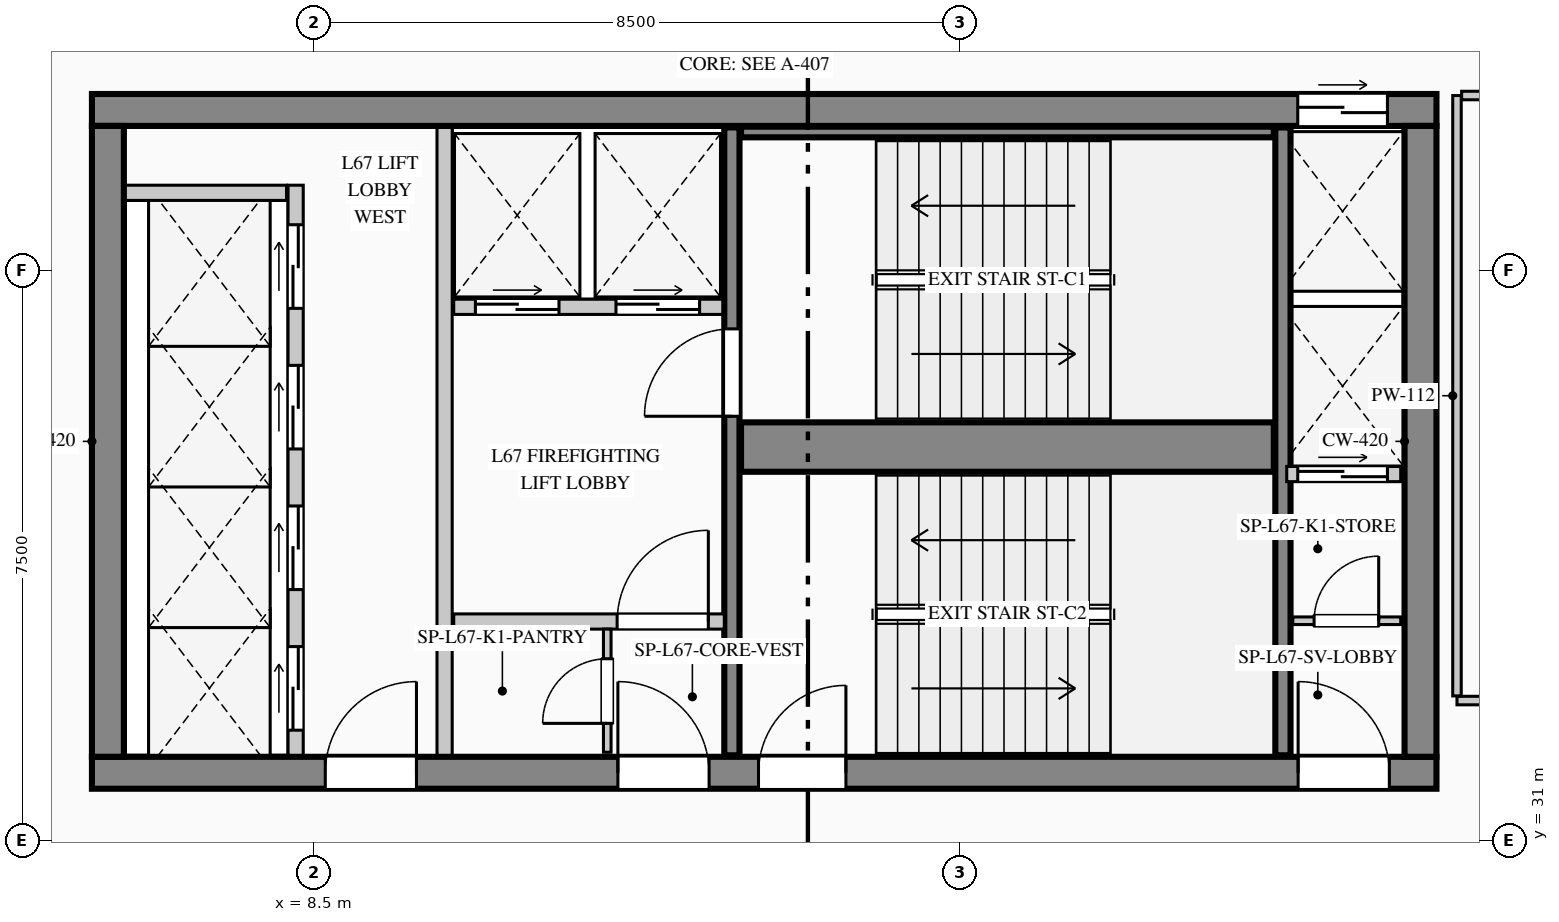
"""IFC4 building model, lengths in metres.
Left out: names, types, materials, properties, quantities, classifications, styles, units other than length and angle.
Written with IfcOpenShell. Run it as: python <this file> out.ifc"""

import sys

from ifc_helpers import new_model, si_unit, direction, frame, frame_2d, origin, place, context, subcontext, project, spatial, rectangle, extrude, element, fill, save


model = new_model("IFC4")
c1 = context("Model", 3, precision=1e-05, world=origin(), true_north=direction((0.0, 1.0)))
c2 = subcontext(c1, "Body", "Model", "MODEL_VIEW")
j1 = project(units=[si_unit("LENGTHUNIT", "METRE"), si_unit("PLANEANGLEUNIT", "RADIAN")], contexts=[c1])
p1 = place(None, origin())
s1 = spatial("IfcSite", under=j1, at=p1, CompositionType="ELEMENT")
p2 = place(p1, origin())
s2 = spatial("IfcBuilding", under=s1, at=p2, CompositionType="ELEMENT")
p3 = place(p2, frame((0.0, 0.0, 280.4)))
s3 = spatial("IfcBuildingStorey", under=s2, at=p3, CompositionType="ELEMENT", Elevation=280.4)
p4 = place(p3, frame((5.58, 40.61, 0.0), z_axis=(0.0, 0.0, 1.0), x_axis=(1.0, 0.0, 0.0)))
e1 = element("IfcWall", 1, at=p4, inside=s3, PredefinedType="SHEAR", context=c2, shape_type="SweptSolid", body=[
    extrude(rectangle(XDim=17.69, YDim=0.42, at=frame_2d((8.845, 0.0))), origin(), (0.0, 0.0, 1.0), 3.95),
])
p5 = place(p4, frame((15.865, 0.0, 0.0)))
e2 = element("IfcOpeningElement", 2, at=p5, cuts=e1, PredefinedType="OPENING", context=c2, shape_type="SweptSolid", body=[
    extrude(rectangle(XDim=1.18, YDim=2.25, at=frame_2d((0.59, 1.125))), frame((0.0, 0.22, 0.0), z_axis=(0.0, -1.0, 0.0), x_axis=(1.0, 0.0, 0.0)), (0.0, 0.0, 1.0), 0.44),
])
p6 = place(p3, frame((5.58, 31.89, 0.0), z_axis=(0.0, 0.0, 1.0), x_axis=(1.0, 0.0, 0.0)))
e3 = element("IfcWall", 3, at=p6, inside=s3, PredefinedType="SHEAR", context=c2, shape_type="SweptSolid", body=[
    extrude(rectangle(XDim=17.69, YDim=0.42, at=frame_2d((8.845, 0.0))), origin(), (0.0, 0.0, 1.0), 3.95),
])
p7 = place(p6, frame((3.07, 0.0, 0.0)))
e4 = element("IfcOpeningElement", 4, at=p7, cuts=e3, PredefinedType="OPENING", context=c2, shape_type="SweptSolid", body=[
    extrude(rectangle(XDim=1.2, YDim=2.2, at=frame_2d((0.6, 1.1))), frame((0.0, 0.22, 0.0), z_axis=(0.0, -1.0, 0.0), x_axis=(1.0, 0.0, 0.0)), (0.0, 0.0, 1.0), 0.44),
])
p8 = place(p6, frame((6.92, 0.0, 0.0)))
e5 = element("IfcOpeningElement", 5, at=p8, cuts=e3, PredefinedType="OPENING", context=c2, shape_type="SweptSolid", body=[
    extrude(rectangle(XDim=1.2, YDim=2.2, at=frame_2d((0.6, 1.1))), frame((0.0, 0.22, 0.0), z_axis=(0.0, -1.0, 0.0), x_axis=(1.0, 0.0, 0.0)), (0.0, 0.0, 1.0), 0.44),
])
p9 = place(p6, frame((8.77, 0.0, 0.0)))
e6 = element("IfcOpeningElement", 6, at=p9, cuts=e3, PredefinedType="OPENING", context=c2, shape_type="SweptSolid", body=[
    extrude(rectangle(XDim=1.15, YDim=2.2, at=frame_2d((0.575, 1.1))), frame((0.0, 0.22, 0.0), z_axis=(0.0, -1.0, 0.0), x_axis=(1.0, 0.0, 0.0)), (0.0, 0.0, 1.0), 0.44),
])
p10 = place(p6, frame((15.87, 0.0, 0.0)))
e7 = element("IfcOpeningElement", 7, at=p10, cuts=e3, PredefinedType="OPENING", context=c2, shape_type="SweptSolid", body=[
    extrude(rectangle(XDim=1.2, YDim=2.2, at=frame_2d((0.6, 1.1))), frame((0.0, 0.22, 0.0), z_axis=(0.0, -1.0, 0.0), x_axis=(1.0, 0.0, 0.0)), (0.0, 0.0, 1.0), 0.44),
])
for number, where, z_axis, x_axis in (
    (8, (5.79, 32.1, 0.0), (0.0, 0.0, 1.0), (0.0, 1.0, 0.0)),
    (9, (23.06, 32.1, 0.0), (0.0, 0.0, 1.0), (0.0, 1.0, 0.0)),
):
    element("IfcWall", number, at=place(p3, frame(where, z_axis=z_axis, x_axis=x_axis)), inside=s3, PredefinedType="SHEAR", context=c2, shape_type="SweptSolid", body=[
        extrude(rectangle(XDim=8.3, YDim=0.42, at=frame_2d((4.15, 0.0))), origin(), (0.0, 0.0, 1.0), 3.95),
    ])
p11 = place(p3, frame((14.0, 32.12, 0.0), z_axis=(0.0, 0.0, 1.0), x_axis=(0.0, 1.0, 0.0)))
e10 = element("IfcWall", 10, at=p11, inside=s3, PredefinedType="SHEAR", context=c2, shape_type="SweptSolid", body=[
    extrude(rectangle(XDim=8.26, YDim=0.2, at=frame_2d((4.13, 0.0))), origin(), (0.0, 0.0, 1.0), 3.95),
])
p12 = place(p11, frame((4.46, 0.0, 0.0)))
e11 = element("IfcOpeningElement", 11, at=p12, cuts=e10, PredefinedType="OPENING", context=c2, shape_type="SweptSolid", body=[
    extrude(rectangle(XDim=1.15, YDim=2.2, at=frame_2d((0.575, 1.1))), frame((0.0, 0.11, 0.0), z_axis=(0.0, -1.0, 0.0), x_axis=(1.0, 0.0, 0.0)), (0.0, 0.0, 1.0), 0.22),
])
p13 = place(p3, frame((14.12, 36.175, 0.0), z_axis=(0.0, 0.0, 1.0), x_axis=(1.0, 0.0, 0.0)))
e12 = element("IfcWall", 12, at=p13, inside=s3, PredefinedType="SHEAR", context=c2, shape_type="SweptSolid", body=[
    extrude(rectangle(XDim=7.01, YDim=0.65, at=frame_2d((3.505, 0.0))), origin(), (0.0, 0.0, 1.0), 3.95),
])
p14 = place(p3, frame((21.25, 32.12, 0.0), z_axis=(0.0, 0.0, 1.0), x_axis=(0.0, 1.0, 0.0)))
e13 = element("IfcWall", 13, at=p14, inside=s3, PredefinedType="SHEAR", context=c2, shape_type="SweptSolid", body=[
    extrude(rectangle(XDim=8.26, YDim=0.2, at=frame_2d((4.13, 0.0))), origin(), (0.0, 0.0, 1.0), 3.95),
])
p15 = place(p3, frame((14.12, 40.32, 0.0), z_axis=(0.0, 0.0, 1.0), x_axis=(1.0, 0.0, 0.0)))
e14 = element("IfcWall", 14, at=p15, inside=s3, PredefinedType="SHEAR", context=c2, shape_type="SweptSolid", body=[
    extrude(rectangle(XDim=7.01, YDim=0.14, at=frame_2d((3.505, 0.0))), origin(), (0.0, 0.0, 1.0), 3.95),
])
p16 = place(p3, frame((5.6, 4.32, 0.0), z_axis=(0.0, 0.0, 1.0), x_axis=(-0.075839920993, 0.997120006009, 0.0)))
e15 = element("IfcWall", 15, at=p16, inside=s3, PredefinedType="STANDARD", context=c2, shape_type="SweptSolid", body=[
    extrude(rectangle(XDim=37.468, YDim=0.24, at=frame_2d((18.734, 0.0))), origin(), (0.0, 0.0, 1.0), 3.7),
])
p17 = place(p16, frame((12.663, 0.0, 0.9)))
e16 = element("IfcOpeningElement", 16, at=p17, cuts=e15, PredefinedType="OPENING", context=c2, shape_type="SweptSolid", body=[
    extrude(rectangle(XDim=1.65, YDim=1.95, at=frame_2d((0.825, 0.975))), frame((0.0, 0.13, 0.0), z_axis=(0.0, -1.0, 0.0), x_axis=(1.0, 0.0, 0.0)), (0.0, 0.0, 1.0), 0.26),
])
p18 = place(p3, frame((8.26, 32.12, 0.0), z_axis=(0.0, 0.0, 1.0), x_axis=(0.0, 1.0, 0.0)))
e17 = element("IfcWall", 17, at=p18, inside=s3, PredefinedType="PARTITIONING", context=c2, shape_type="SweptSolid", body=[
    extrude(rectangle(XDim=7.5, YDim=0.2, at=frame_2d((3.75, 0.0))), origin(), (0.0, 0.0, 1.0), 3.7),
])
p19 = place(p18, frame((0.33, 0.0, 0.0)))
e18 = element("IfcOpeningElement", 18, at=p19, cuts=e17, PredefinedType="OPENING", context=c2, shape_type="SweptSolid", body=[
    extrude(rectangle(XDim=1.1, YDim=2.2, at=frame_2d((0.55, 1.1))), frame((0.0, 0.11, 0.0), z_axis=(0.0, -1.0, 0.0), x_axis=(1.0, 0.0, 0.0)), (0.0, 0.0, 1.0), 0.22),
])
p20 = place(p18, frame((2.18, 0.0, 0.0)))
e19 = element("IfcOpeningElement", 19, at=p20, cuts=e17, PredefinedType="OPENING", context=c2, shape_type="SweptSolid", body=[
    extrude(rectangle(XDim=1.1, YDim=2.2, at=frame_2d((0.55, 1.1))), frame((0.0, 0.11, 0.0), z_axis=(0.0, -1.0, 0.0), x_axis=(1.0, 0.0, 0.0)), (0.0, 0.0, 1.0), 0.22),
])
p21 = place(p18, frame((4.03, 0.0, 0.0)))
e20 = element("IfcOpeningElement", 20, at=p21, cuts=e17, PredefinedType="OPENING", context=c2, shape_type="SweptSolid", body=[
    extrude(rectangle(XDim=1.1, YDim=2.2, at=frame_2d((0.55, 1.1))), frame((0.0, 0.11, 0.0), z_axis=(0.0, -1.0, 0.0), x_axis=(1.0, 0.0, 0.0)), (0.0, 0.0, 1.0), 0.22),
])
p22 = place(p18, frame((5.88, 0.0, 0.0)))
e21 = element("IfcOpeningElement", 21, at=p22, cuts=e17, PredefinedType="OPENING", context=c2, shape_type="SweptSolid", body=[
    extrude(rectangle(XDim=1.1, YDim=2.2, at=frame_2d((0.55, 1.1))), frame((0.0, 0.11, 0.0), z_axis=(0.0, -1.0, 0.0), x_axis=(1.0, 0.0, 0.0)), (0.0, 0.0, 1.0), 0.22),
])
p23 = place(p3, frame((6.02, 39.52, 0.0), z_axis=(0.0, 0.0, 1.0), x_axis=(1.0, 0.0, 0.0)))
e22 = element("IfcWall", 22, at=p23, inside=s3, PredefinedType="PARTITIONING", context=c2, shape_type="SweptSolid", body=[
    extrude(rectangle(XDim=2.12, YDim=0.2, at=frame_2d((1.06, 0.0))), origin(), (0.0, 0.0, 1.0), 3.7),
])
p24 = place(p3, frame((10.22, 32.12, 0.0), z_axis=(0.0, 0.0, 1.0), x_axis=(0.0, 1.0, 0.0)))
e23 = element("IfcWall", 23, at=p24, inside=s3, PredefinedType="PARTITIONING", context=c2, shape_type="SweptSolid", body=[
    extrude(rectangle(XDim=8.26, YDim=0.2, at=frame_2d((4.13, 0.0))), origin(), (0.0, 0.0, 1.0), 3.7),
])
p25 = place(p3, frame((10.34, 38.02, 0.0), z_axis=(0.0, 0.0, 1.0), x_axis=(1.0, 0.0, 0.0)))
e24 = element("IfcWall", 24, at=p25, inside=s3, PredefinedType="PARTITIONING", context=c2, shape_type="SweptSolid", body=[
    extrude(rectangle(XDim=3.54, YDim=0.2, at=frame_2d((1.77, 0.0))), origin(), (0.0, 0.0, 1.0), 3.7),
])
p26 = place(p25, frame((0.285, 0.0, 0.0)))
e25 = element("IfcOpeningElement", 25, at=p26, cuts=e24, PredefinedType="OPENING", context=c2, shape_type="SweptSolid", body=[
    extrude(rectangle(XDim=1.1, YDim=2.2, at=frame_2d((0.55, 1.1))), frame((0.0, 0.11, 0.0), z_axis=(0.0, -1.0, 0.0), x_axis=(1.0, 0.0, 0.0)), (0.0, 0.0, 1.0), 0.22),
])
p27 = place(p25, frame((2.135, 0.0, 0.0)))
e26 = element("IfcOpeningElement", 26, at=p27, cuts=e24, PredefinedType="OPENING", context=c2, shape_type="SweptSolid", body=[
    extrude(rectangle(XDim=1.1, YDim=2.2, at=frame_2d((0.55, 1.1))), frame((0.0, 0.11, 0.0), z_axis=(0.0, -1.0, 0.0), x_axis=(1.0, 0.0, 0.0)), (0.0, 0.0, 1.0), 0.22),
])
p28 = place(p3, frame((10.34, 33.88, 0.0), z_axis=(0.0, 0.0, 1.0), x_axis=(1.0, 0.0, 0.0)))
e27 = element("IfcWall", 27, at=p28, inside=s3, PredefinedType="PARTITIONING", context=c2, shape_type="SweptSolid", body=[
    extrude(rectangle(XDim=3.56, YDim=0.2, at=frame_2d((1.78, 0.0))), origin(), (0.0, 0.0, 1.0), 3.7),
])
p29 = place(p28, frame((2.15, 0.0, 0.0)))
e28 = element("IfcOpeningElement", 28, at=p29, cuts=e27, PredefinedType="OPENING", context=c2, shape_type="SweptSolid", body=[
    extrude(rectangle(XDim=1.2, YDim=2.2, at=frame_2d((0.6, 1.1))), frame((0.0, 0.11, 0.0), z_axis=(0.0, -1.0, 0.0), x_axis=(1.0, 0.0, 0.0)), (0.0, 0.0, 1.0), 0.22),
])
p30 = place(p3, frame((12.36, 32.16, 0.0), z_axis=(0.0, 0.0, 1.0), x_axis=(0.0, 1.0, 0.0)))
e29 = element("IfcWall", 29, at=p30, inside=s3, PredefinedType="PARTITIONING", context=c2, shape_type="SweptSolid", body=[
    extrude(rectangle(XDim=1.62, YDim=0.1, at=frame_2d((0.81, 0.0))), origin(), (0.0, 0.0, 1.0), 3.7),
])
p31 = place(p30, frame((0.38, 0.0, 0.0)))
e30 = element("IfcOpeningElement", 30, at=p31, cuts=e29, PredefinedType="OPENING", context=c2, shape_type="SweptSolid", body=[
    extrude(rectangle(XDim=0.85, YDim=2.1, at=frame_2d((0.425, 1.05))), frame((0.0, 0.06, 0.0), z_axis=(0.0, -1.0, 0.0), x_axis=(1.0, 0.0, 0.0)), (0.0, 0.0, 1.0), 0.12),
])
p32 = place(p3, frame((21.38, 33.89, 0.0), z_axis=(0.0, 0.0, 1.0), x_axis=(1.0, 0.0, 0.0)))
e31 = element("IfcWall", 31, at=p32, inside=s3, PredefinedType="PARTITIONING", context=c2, shape_type="SweptSolid", body=[
    extrude(rectangle(XDim=1.42, YDim=0.1, at=frame_2d((0.71, 0.0))), origin(), (0.0, 0.0, 1.0), 3.7),
])
p33 = place(p32, frame((0.28, 0.0, 0.0)))
e32 = element("IfcOpeningElement", 32, at=p33, cuts=e31, PredefinedType="OPENING", context=c2, shape_type="SweptSolid", body=[
    extrude(rectangle(XDim=0.85, YDim=2.1, at=frame_2d((0.425, 1.05))), frame((0.0, 0.06, 0.0), z_axis=(0.0, -1.0, 0.0), x_axis=(1.0, 0.0, 0.0)), (0.0, 0.0, 1.0), 0.12),
])
p34 = place(p3, frame((21.3, 35.82, 0.0), z_axis=(0.0, 0.0, 1.0), x_axis=(1.0, 0.0, 0.0)))
e33 = element("IfcWall", 33, at=p34, inside=s3, PredefinedType="PARTITIONING", context=c2, shape_type="SweptSolid", body=[
    extrude(rectangle(XDim=1.5, YDim=0.2, at=frame_2d((0.75, 0.0))), origin(), (0.0, 0.0, 1.0), 3.7),
])
p35 = place(p34, frame((0.145, 0.0, 0.0)))
e34 = element("IfcOpeningElement", 34, at=p35, cuts=e33, PredefinedType="OPENING", context=c2, shape_type="SweptSolid", body=[
    extrude(rectangle(XDim=1.18, YDim=2.25, at=frame_2d((0.59, 1.125))), frame((0.0, 0.11, 0.0), z_axis=(0.0, -1.0, 0.0), x_axis=(1.0, 0.0, 0.0)), (0.0, 0.0, 1.0), 0.22),
])
p36 = place(p3, frame((28.654, 32.84, 0.0), z_axis=(0.0, 0.0, 1.0), x_axis=(-1.0, 0.0, 0.0)))
e35 = element("IfcWall", 35, at=p36, inside=s3, PredefinedType="PARTITIONING", context=c2, shape_type="SweptSolid", body=[
    extrude(rectangle(XDim=5.114, YDim=0.112, at=frame_2d((2.557, 0.0))), origin(), (0.0, 0.0, 1.0), 3.7),
])
p37 = place(p36, frame((2.677, 0.0, 0.0)))
e36 = element("IfcOpeningElement", 36, at=p37, cuts=e35, PredefinedType="OPENING", context=c2, shape_type="SweptSolid", body=[
    extrude(rectangle(XDim=1.0, YDim=2.15, at=frame_2d((0.5, 1.075))), frame((0.0, 0.066, 0.0), z_axis=(0.0, -1.0, 0.0), x_axis=(1.0, 0.0, 0.0)), (0.0, 0.0, 1.0), 0.132),
])
p38 = place(p3, frame((23.54, 32.901, 0.0), z_axis=(0.0, 0.0, 1.0), x_axis=(0.0, 1.0, 0.0)))
e37 = element("IfcWall", 37, at=p38, inside=s3, PredefinedType="PARTITIONING", context=c2, shape_type="SweptSolid", body=[
    extrude(rectangle(XDim=7.899, YDim=0.112, at=frame_2d((3.95, 0.0))), origin(), (0.0, 0.0, 1.0), 3.7),
])
p39 = place(p3, frame((23.601, 40.8, 0.0), z_axis=(0.0, 0.0, 1.0), x_axis=(1.0, 0.0, 0.0)))
e38 = element("IfcWall", 38, at=p39, inside=s3, PredefinedType="PARTITIONING", context=c2, shape_type="SweptSolid", body=[
    extrude(rectangle(XDim=5.869, YDim=0.112, at=frame_2d((2.935, 0.0))), origin(), (0.0, 0.0, 1.0), 3.7),
])
p40 = place(p7, origin())
e39 = element("IfcDoor", 39, at=p40, inside=s3, OperationType="SINGLE_SWING_RIGHT", PredefinedType="DOOR", context=c2, shape_type="SweptSolid", body=[
    extrude(rectangle(XDim=1.2, YDim=2.2, at=frame_2d((0.6, 1.1))), frame((0.0, 0.025, 0.0), z_axis=(0.0, -1.0, 0.0), x_axis=(1.0, 0.0, 0.0)), (0.0, 0.0, 1.0), 0.05),
])
fill(e4, e39)
p41 = place(p8, origin())
e40 = element("IfcDoor", 40, at=p41, inside=s3, OperationType="SINGLE_SWING_LEFT", PredefinedType="DOOR", context=c2, shape_type="SweptSolid", body=[
    extrude(rectangle(XDim=1.2, YDim=2.2, at=frame_2d((0.6, 1.1))), frame((0.0, 0.025, 0.0), z_axis=(0.0, -1.0, 0.0), x_axis=(1.0, 0.0, 0.0)), (0.0, 0.0, 1.0), 0.05),
])
fill(e5, e40)
p42 = place(p9, origin())
e41 = element("IfcDoor", 41, at=p42, inside=s3, OperationType="SINGLE_SWING_RIGHT", PredefinedType="DOOR", context=c2, shape_type="SweptSolid", body=[
    extrude(rectangle(XDim=1.15, YDim=2.2, at=frame_2d((0.575, 1.1))), frame((0.0, 0.025, 0.0), z_axis=(0.0, -1.0, 0.0), x_axis=(1.0, 0.0, 0.0)), (0.0, 0.0, 1.0), 0.05),
])
fill(e6, e41)
p43 = place(p10, origin())
e42 = element("IfcDoor", 42, at=p43, inside=s3, OperationType="SINGLE_SWING_LEFT", PredefinedType="DOOR", context=c2, shape_type="SweptSolid", body=[
    extrude(rectangle(XDim=1.2, YDim=2.2, at=frame_2d((0.6, 1.1))), frame((0.0, 0.025, 0.0), z_axis=(0.0, -1.0, 0.0), x_axis=(1.0, 0.0, 0.0)), (0.0, 0.0, 1.0), 0.05),
])
fill(e7, e42)
p44 = place(p29, origin())
e43 = element("IfcDoor", 43, at=p44, inside=s3, OperationType="SINGLE_SWING_RIGHT", PredefinedType="DOOR", context=c2, shape_type="SweptSolid", body=[
    extrude(rectangle(XDim=1.2, YDim=2.2, at=frame_2d((0.6, 1.1))), frame((0.0, 0.025, 0.0), z_axis=(0.0, -1.0, 0.0), x_axis=(1.0, 0.0, 0.0)), (0.0, 0.0, 1.0), 0.05),
])
fill(e28, e43)
p45 = place(p31, origin())
e44 = element("IfcDoor", 44, at=p45, inside=s3, OperationType="SINGLE_SWING_LEFT", PredefinedType="DOOR", context=c2, shape_type="SweptSolid", body=[
    extrude(rectangle(XDim=0.85, YDim=2.1, at=frame_2d((0.425, 1.05))), frame((0.0, 0.025, 0.0), z_axis=(0.0, -1.0, 0.0), x_axis=(1.0, 0.0, 0.0)), (0.0, 0.0, 1.0), 0.05),
])
fill(e30, e44)
p46 = place(p33, origin())
e45 = element("IfcDoor", 45, at=p46, inside=s3, OperationType="SINGLE_SWING_RIGHT", PredefinedType="DOOR", context=c2, shape_type="SweptSolid", body=[
    extrude(rectangle(XDim=0.85, YDim=2.1, at=frame_2d((0.425, 1.05))), frame((0.0, 0.025, 0.0), z_axis=(0.0, -1.0, 0.0), x_axis=(1.0, 0.0, 0.0)), (0.0, 0.0, 1.0), 0.05),
])
fill(e32, e45)
p47 = place(p12, origin())
e46 = element("IfcDoor", 46, at=p47, inside=s3, OperationType="SINGLE_SWING_LEFT", PredefinedType="DOOR", context=c2, shape_type="SweptSolid", body=[
    extrude(rectangle(XDim=1.15, YDim=2.2, at=frame_2d((0.575, 1.1))), frame((0.0, 0.025, 0.0), z_axis=(0.0, -1.0, 0.0), x_axis=(1.0, 0.0, 0.0)), (0.0, 0.0, 1.0), 0.05),
])
fill(e11, e46)
p48 = place(p19, origin())
e47 = element("IfcDoor", 47, at=p48, inside=s3, OperationType="DOUBLE_DOOR_SLIDING", PredefinedType="DOOR", context=c2, shape_type="SweptSolid", body=[
    extrude(rectangle(XDim=1.1, YDim=2.2, at=frame_2d((0.55, 1.1))), frame((0.0, 0.025, 0.0), z_axis=(0.0, -1.0, 0.0), x_axis=(1.0, 0.0, 0.0)), (0.0, 0.0, 1.0), 0.05),
])
fill(e18, e47)
p49 = place(p20, origin())
e48 = element("IfcDoor", 48, at=p49, inside=s3, OperationType="DOUBLE_DOOR_SLIDING", PredefinedType="DOOR", context=c2, shape_type="SweptSolid", body=[
    extrude(rectangle(XDim=1.1, YDim=2.2, at=frame_2d((0.55, 1.1))), frame((0.0, 0.025, 0.0), z_axis=(0.0, -1.0, 0.0), x_axis=(1.0, 0.0, 0.0)), (0.0, 0.0, 1.0), 0.05),
])
fill(e19, e48)
p50 = place(p21, origin())
e49 = element("IfcDoor", 49, at=p50, inside=s3, OperationType="DOUBLE_DOOR_SLIDING", PredefinedType="DOOR", context=c2, shape_type="SweptSolid", body=[
    extrude(rectangle(XDim=1.1, YDim=2.2, at=frame_2d((0.55, 1.1))), frame((0.0, 0.025, 0.0), z_axis=(0.0, -1.0, 0.0), x_axis=(1.0, 0.0, 0.0)), (0.0, 0.0, 1.0), 0.05),
])
fill(e20, e49)
p51 = place(p22, origin())
e50 = element("IfcDoor", 50, at=p51, inside=s3, OperationType="DOUBLE_DOOR_SLIDING", PredefinedType="DOOR", context=c2, shape_type="SweptSolid", body=[
    extrude(rectangle(XDim=1.1, YDim=2.2, at=frame_2d((0.55, 1.1))), frame((0.0, 0.025, 0.0), z_axis=(0.0, -1.0, 0.0), x_axis=(1.0, 0.0, 0.0)), (0.0, 0.0, 1.0), 0.05),
])
fill(e21, e50)
p52 = place(p26, origin())
e51 = element("IfcDoor", 51, at=p52, inside=s3, OperationType="DOUBLE_DOOR_SLIDING", PredefinedType="DOOR", context=c2, shape_type="SweptSolid", body=[
    extrude(rectangle(XDim=1.1, YDim=2.2, at=frame_2d((0.55, 1.1))), frame((0.0, 0.025, 0.0), z_axis=(0.0, -1.0, 0.0), x_axis=(1.0, 0.0, 0.0)), (0.0, 0.0, 1.0), 0.05),
])
fill(e25, e51)
p53 = place(p27, origin())
e52 = element("IfcDoor", 52, at=p53, inside=s3, OperationType="DOUBLE_DOOR_SLIDING", PredefinedType="DOOR", context=c2, shape_type="SweptSolid", body=[
    extrude(rectangle(XDim=1.1, YDim=2.2, at=frame_2d((0.55, 1.1))), frame((0.0, 0.025, 0.0), z_axis=(0.0, -1.0, 0.0), x_axis=(1.0, 0.0, 0.0)), (0.0, 0.0, 1.0), 0.05),
])
fill(e26, e52)
p54 = place(p5, origin())
e53 = element("IfcDoor", 53, at=p54, inside=s3, OperationType="DOUBLE_DOOR_SLIDING", PredefinedType="DOOR", context=c2, shape_type="SweptSolid", body=[
    extrude(rectangle(XDim=1.18, YDim=2.25, at=frame_2d((0.59, 1.125))), frame((0.0, 0.025, 0.0), z_axis=(0.0, -1.0, 0.0), x_axis=(1.0, 0.0, 0.0)), (0.0, 0.0, 1.0), 0.05),
])
fill(e2, e53)
p55 = place(p35, origin())
e54 = element("IfcDoor", 54, at=p55, inside=s3, OperationType="DOUBLE_DOOR_SLIDING", PredefinedType="DOOR", context=c2, shape_type="SweptSolid", body=[
    extrude(rectangle(XDim=1.18, YDim=2.25, at=frame_2d((0.59, 1.125))), frame((0.0, 0.025, 0.0), z_axis=(0.0, -1.0, 0.0), x_axis=(1.0, 0.0, 0.0)), (0.0, 0.0, 1.0), 0.05),
])
fill(e34, e54)
save(model, sys.argv[1])
